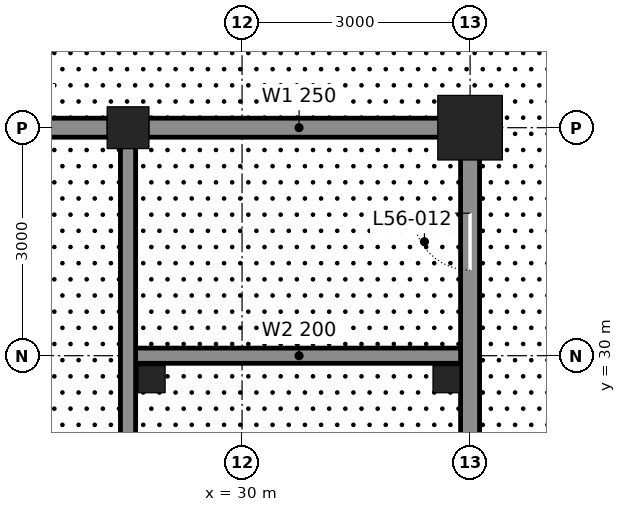
"""IFC4 building model, lengths in metres.
Left out: names, types, materials, properties, quantities, classifications, styles, units other than length and angle.
Written with IfcOpenShell. Run it as: python <this file> out.ifc"""

import sys

from ifc_helpers import new_model, si_unit, direction, frame, frame_2d, origin, origin_2d, place, context, subcontext, project, spatial, rectangle, hollow_rectangle, extrude, element, fill, save


model = new_model("IFC4")
c1 = context("Model", 3, precision=1e-05, world=origin(), true_north=direction((0.0, 1.0)))
c2 = subcontext(c1, "Body", "Model", "MODEL_VIEW")
j1 = project(units=[si_unit("LENGTHUNIT", "METRE"), si_unit("PLANEANGLEUNIT", "RADIAN")], contexts=[c1])
p1 = place(None, origin())
s1 = spatial("IfcSite", under=j1, at=p1, CompositionType="ELEMENT")
p2 = place(p1, origin())
s2 = spatial("IfcBuilding", under=s1, at=p2, CompositionType="ELEMENT")
p3 = place(p2, frame((0.0, 0.0, 251.7)))
s3 = spatial("IfcBuildingStorey", under=s2, at=p3, CompositionType="ELEMENT", Elevation=251.7)
p4 = place(p3, frame((28.5, 33.0, 0.0), z_axis=(0.0, 0.0, 1.0), x_axis=(1.0, 0.0, 0.0)))
e1 = element("IfcColumn", 1, at=p4, inside=s3, PredefinedType="COLUMN", context=c2, shape_type="SweptSolid", body=[
    extrude(hollow_rectangle(XDim=0.55, YDim=0.55, WallThickness=0.045, at=origin_2d()), origin(), (0.0, 0.0, 1.0), 6.0),
])
p5 = place(p3, frame((33.0, 33.0, 0.0), z_axis=(0.0, 0.0, 1.0), x_axis=(1.0, 0.0, 0.0)))
e2 = element("IfcColumn", 2, at=p5, inside=s3, PredefinedType="COLUMN", context=c2, shape_type="SweptSolid", body=[
    extrude(hollow_rectangle(XDim=0.85, YDim=0.85, WallThickness=0.085, at=origin_2d()), origin(), (0.0, 0.0, 1.0), 6.0),
])
p6 = place(p3, frame((28.5, 30.0, 0.0), z_axis=(0.0, 0.0, 1.0), x_axis=(1.0, 0.0, 0.0)))
e3 = element("IfcWall", 3, at=p6, inside=s3, PredefinedType="SOLIDWALL", context=c2, shape_type="SweptSolid", body=[
    extrude(rectangle(XDim=4.5, YDim=0.2, at=frame_2d((2.25, 0.0))), origin(), (0.0, 0.0, 1.0), 5.84),
])
p7 = place(p3, frame((25.75, 33.0, 0.0), z_axis=(0.0, 0.0, 1.0), x_axis=(1.0, 0.0, 0.0)))
e4 = element("IfcWall", 4, at=p7, inside=s3, PredefinedType="SOLIDWALL", context=c2, shape_type="SweptSolid", body=[
    extrude(rectangle(XDim=2.5, YDim=0.25, at=frame_2d((1.25, 0.0))), origin(), (0.0, 0.0, 1.0), 4.981),
])
p8 = place(p3, frame((28.75, 33.0, 0.0), z_axis=(0.0, 0.0, 1.0), x_axis=(1.0, 0.0, 0.0)))
e5 = element("IfcWall", 5, at=p8, inside=s3, PredefinedType="SOLIDWALL", context=c2, shape_type="SweptSolid", body=[
    extrude(rectangle(XDim=4.0, YDim=0.25, at=frame_2d((2.0, 0.0))), origin(), (0.0, 0.0, 1.0), 4.981),
])
p9 = place(p3, frame((28.5, 24.25, 0.0), z_axis=(0.0, 0.0, 1.0), x_axis=(0.0, 1.0, 0.0)))
e6 = element("IfcWall", 6, at=p9, inside=s3, PredefinedType="SOLIDWALL", context=c2, shape_type="SweptSolid", body=[
    extrude(rectangle(XDim=8.5, YDim=0.2, at=frame_2d((4.25, 0.0))), origin(), (0.0, 0.0, 1.0), 4.913),
])
p10 = place(p3, frame((33.0, 24.25, 0.0), z_axis=(0.0, 0.0, 1.0), x_axis=(0.0, 1.0, 0.0)))
e7 = element("IfcWall", 7, at=p10, inside=s3, PredefinedType="SOLIDWALL", context=c2, shape_type="SweptSolid", body=[
    extrude(rectangle(XDim=8.5, YDim=0.25, at=frame_2d((4.25, 0.0))), origin(), (0.0, 0.0, 1.0), 4.913),
])
p11 = place(p10, frame((6.875, 0.0, 0.0)))
e8 = element("IfcOpeningElement", 8, at=p11, cuts=e7, PredefinedType="OPENING", context=c2, shape_type="SweptSolid", body=[
    extrude(rectangle(XDim=0.75, YDim=2.1, at=frame_2d((0.375, 1.05))), frame((0.0, 0.135, 0.0), z_axis=(0.0, -1.0, 0.0), x_axis=(1.0, 0.0, 0.0)), (0.0, 0.0, 1.0), 0.27),
])
for number, where, z_axis, x_axis in (
    (9, (28.81, 29.69, 0.0), (0.0, 0.0, 1.0), (1.0, 0.0, 0.0)),
    (10, (32.69, 29.69, 0.0), (0.0, 0.0, 1.0), (1.0, 0.0, 0.0)),
):
    element("IfcColumn", number, at=place(p3, frame(where, z_axis=z_axis, x_axis=x_axis)), inside=s3, PredefinedType="COLUMN", context=c2, shape_type="SweptSolid", body=[
        extrude(hollow_rectangle(XDim=0.356, YDim=0.356, WallThickness=0.009, at=origin_2d()), origin(), (0.0, 0.0, 1.0), 6.0),
    ])
p12 = place(p11, origin())
e11 = element("IfcDoor", 11, at=p12, inside=s3, OperationType="SINGLE_SWING_RIGHT", PredefinedType="DOOR", context=c2, shape_type="SweptSolid", body=[
    extrude(rectangle(XDim=0.75, YDim=2.1, at=frame_2d((0.375, 1.05))), frame((0.0, 0.025, 0.0), z_axis=(0.0, -1.0, 0.0), x_axis=(1.0, 0.0, 0.0)), (0.0, 0.0, 1.0), 0.05),
])
fill(e8, e11)
save(model, sys.argv[1])
